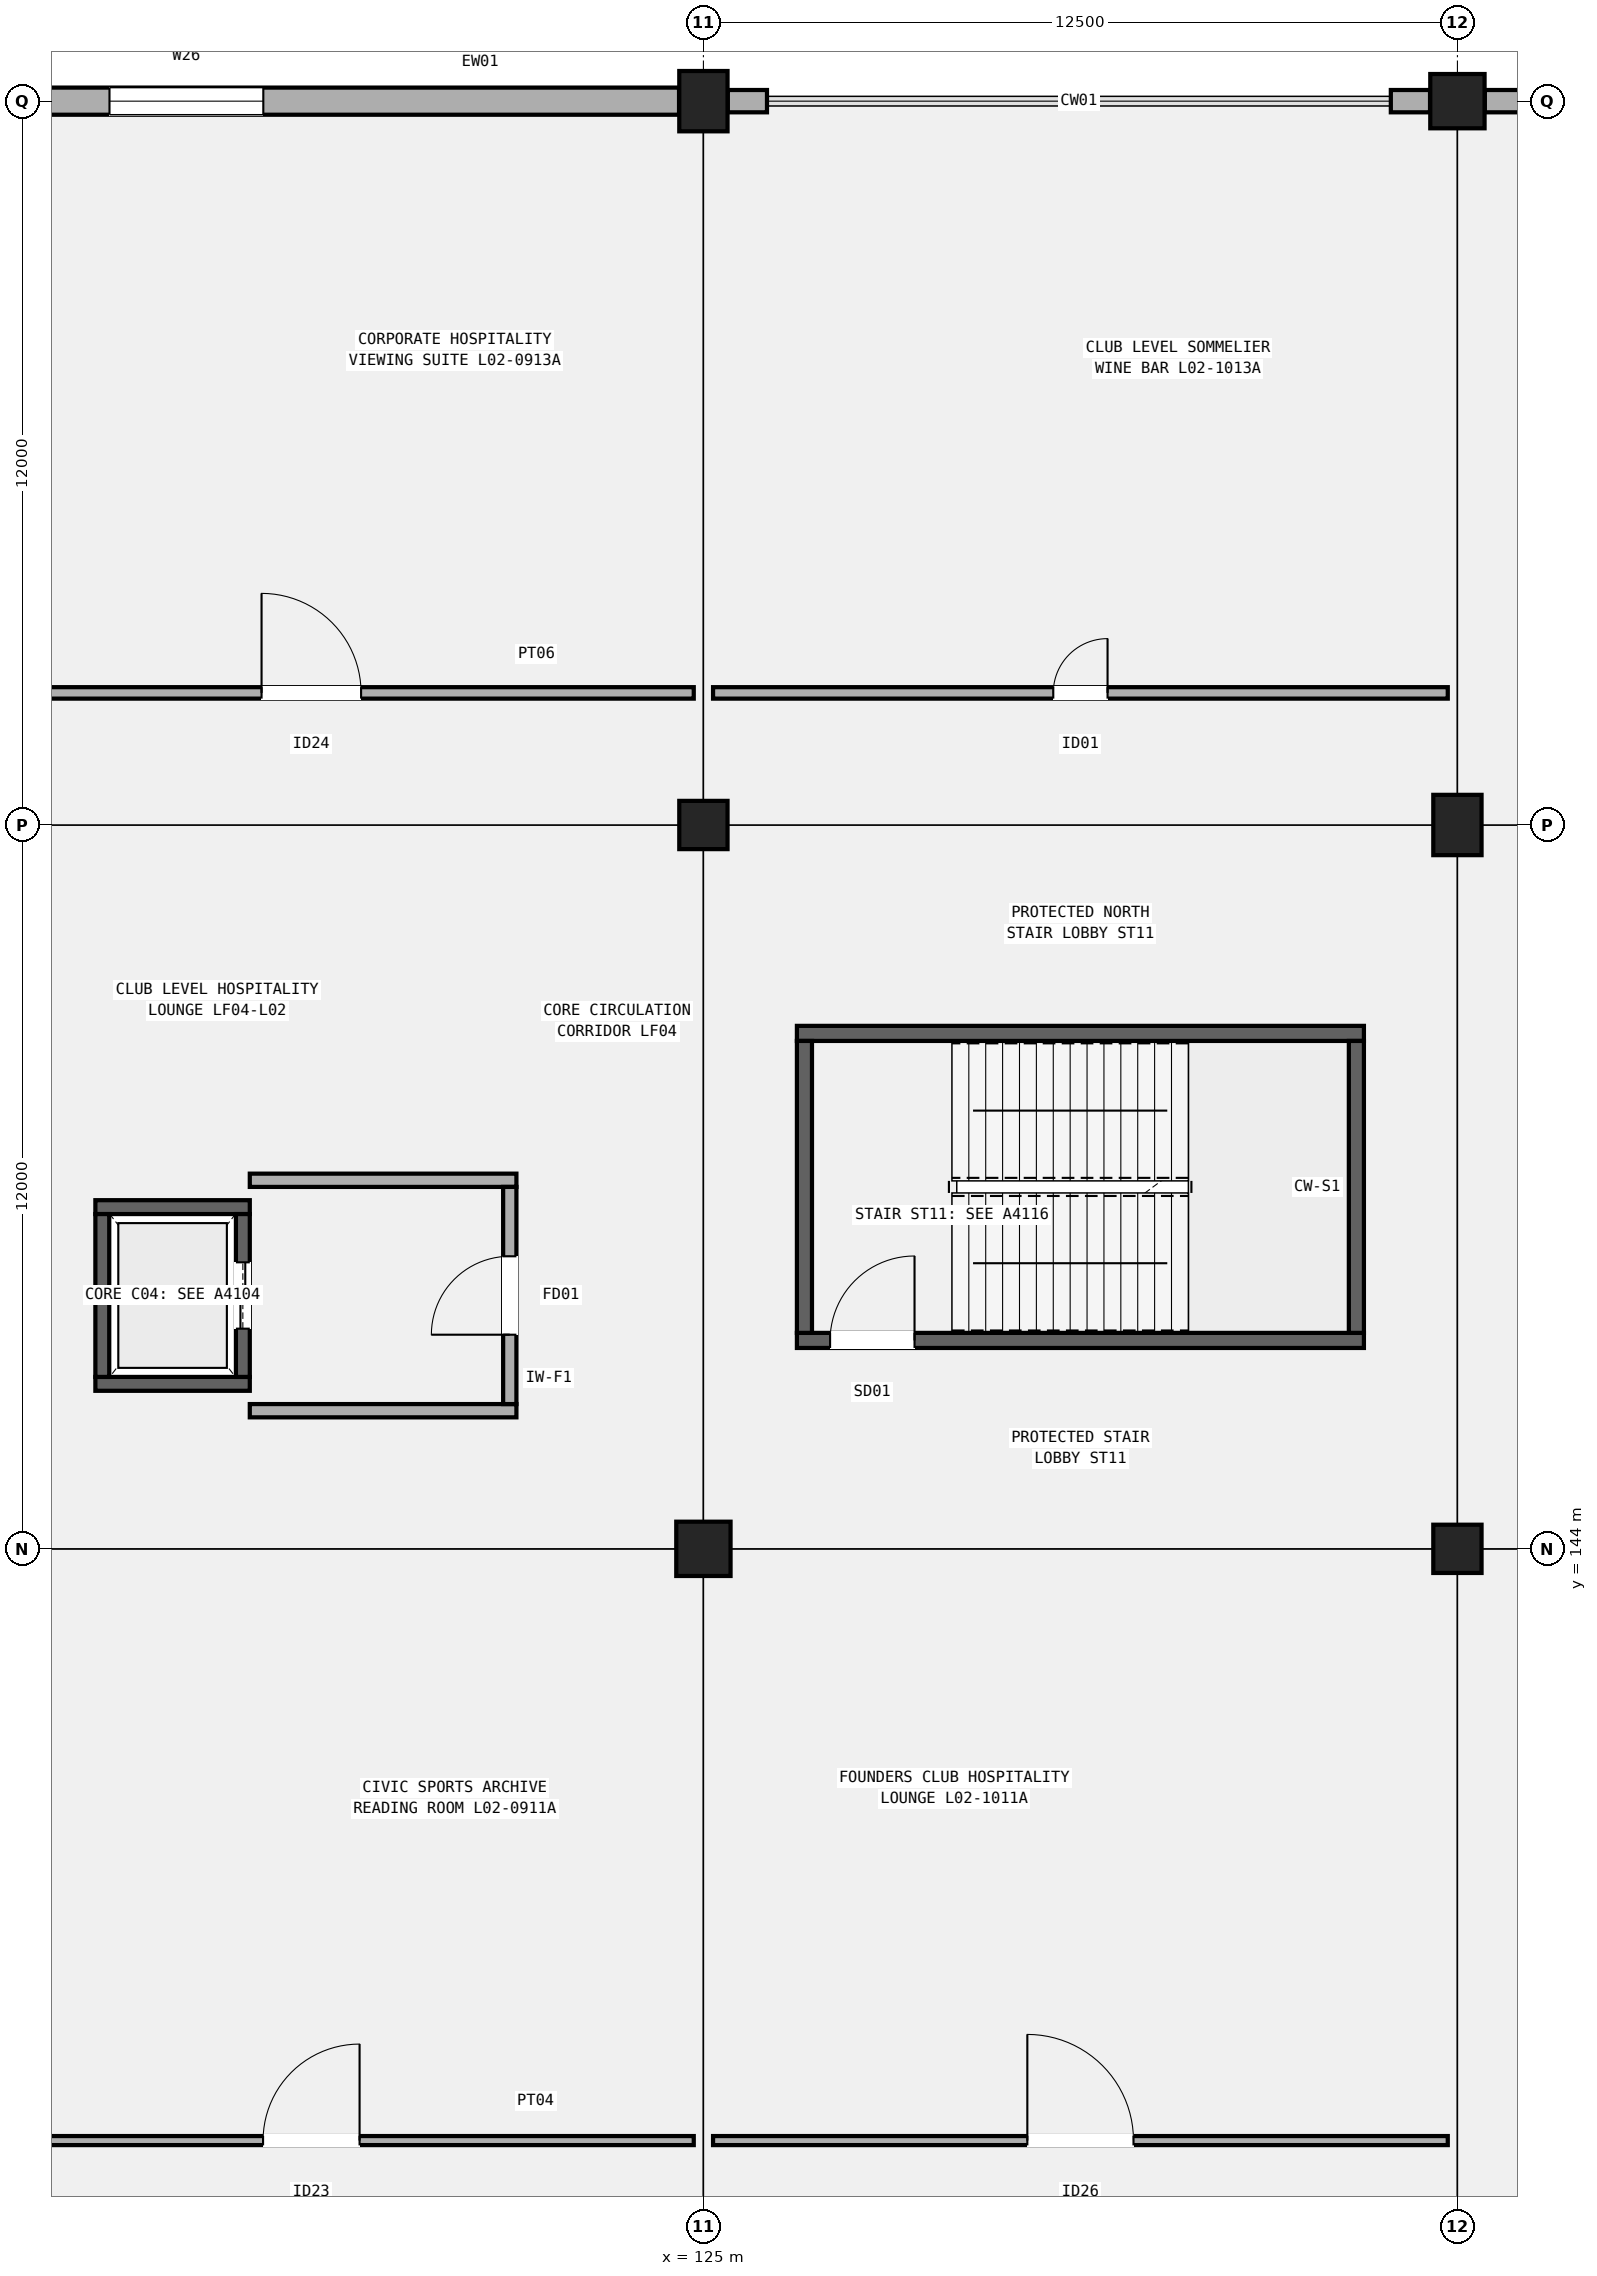
"""IFC4 building model, lengths in metres.
Left out: names, types, materials, properties, quantities, classifications, styles, units other than length and angle.
Written with IfcOpenShell. Run it as: python <this file> out.ifc"""

import sys

from ifc_helpers import new_model, si_unit, direction, frame, frame_2d, origin, origin_2d, place, context, subcontext, project, spatial, rectangle, extrude, element, fill, save


model = new_model("IFC4")
c1 = context("Model", 3, precision=1e-05, world=origin(), true_north=direction((0.0, 1.0)))
c2 = subcontext(c1, "Body", "Model", "MODEL_VIEW")
j1 = project(units=[si_unit("LENGTHUNIT", "METRE"), si_unit("PLANEANGLEUNIT", "RADIAN")], contexts=[c1])
p1 = place(None, origin())
s1 = spatial("IfcSite", under=j1, at=p1, CompositionType="ELEMENT")
p2 = place(p1, origin())
s2 = spatial("IfcBuilding", under=s1, at=p2, CompositionType="ELEMENT")
p3 = place(p2, frame((0.0, 0.0, 10.2)))
s3 = spatial("IfcBuildingStorey", under=s2, at=p3, CompositionType="ELEMENT", Elevation=10.2)
p4 = place(p3, frame((125.0, 144.0, 0.0), z_axis=(0.0, 0.0, 1.0), x_axis=(1.0, 0.0, 0.0)))
e1 = element("IfcColumn", 1, at=p4, inside=s3, PredefinedType="COLUMN", context=c2, shape_type="SweptSolid", body=[
    extrude(rectangle(XDim=0.9, YDim=0.9, at=origin_2d()), origin(), (0.0, 0.0, 1.0), 5.1),
])
p5 = place(p3, frame((125.0, 156.0, 0.0), z_axis=(0.0, 0.0, 1.0), x_axis=(1.0, 0.0, 0.0)))
e2 = element("IfcColumn", 2, at=p5, inside=s3, PredefinedType="COLUMN", context=c2, shape_type="SweptSolid", body=[
    extrude(rectangle(XDim=0.8, YDim=0.8, at=origin_2d()), origin(), (0.0, 0.0, 1.0), 5.1),
])
p6 = place(p3, frame((125.0, 168.0, 0.0), z_axis=(0.0, 0.0, 1.0), x_axis=(1.0, 0.0, 0.0)))
e3 = element("IfcColumn", 3, at=p6, inside=s3, PredefinedType="COLUMN", context=c2, shape_type="SweptSolid", body=[
    extrude(rectangle(XDim=0.8, YDim=1.0, at=origin_2d()), origin(), (0.0, 0.0, 1.0), 5.1),
])
p7 = place(p3, frame((137.5, 144.0, 0.0), z_axis=(0.0, 0.0, 1.0), x_axis=(1.0, 0.0, 0.0)))
e4 = element("IfcColumn", 4, at=p7, inside=s3, PredefinedType="COLUMN", context=c2, shape_type="SweptSolid", body=[
    extrude(rectangle(XDim=0.8, YDim=0.8, at=origin_2d()), origin(), (0.0, 0.0, 1.0), 5.1),
])
p8 = place(p3, frame((137.5, 156.0, 0.0), z_axis=(0.0, 0.0, 1.0), x_axis=(1.0, 0.0, 0.0)))
e5 = element("IfcColumn", 5, at=p8, inside=s3, PredefinedType="COLUMN", context=c2, shape_type="SweptSolid", body=[
    extrude(rectangle(XDim=0.8, YDim=1.0, at=origin_2d()), origin(), (0.0, 0.0, 1.0), 5.1),
])
p9 = place(p3, frame((137.5, 168.0, 0.0), z_axis=(0.0, 0.0, 1.0), x_axis=(1.0, 0.0, 0.0)))
e6 = element("IfcColumn", 6, at=p9, inside=s3, PredefinedType="COLUMN", context=c2, shape_type="SweptSolid", body=[
    extrude(rectangle(XDim=0.9, YDim=0.9, at=origin_2d()), origin(), (0.0, 0.0, 1.0), 5.1),
])
p10 = place(p3, frame((112.404, 168.0, 0.0), z_axis=(0.0, 0.0, 1.0), x_axis=(1.0, 0.0, 0.0)))
e7 = element("IfcWall", 7, at=p10, inside=s3, PredefinedType="SOLIDWALL", context=c2, shape_type="SweptSolid", body=[
    extrude(rectangle(XDim=12.192, YDim=0.45, at=frame_2d((6.096, 0.0))), origin(), (0.0, 0.0, 1.0), 4.22),
])
p11 = place(p10, frame((2.75, 0.0, 0.95)))
e8 = element("IfcOpeningElement", 8, at=p11, cuts=e7, PredefinedType="OPENING", context=c2, shape_type="SweptSolid", body=[
    extrude(rectangle(XDim=2.55, YDim=1.95, at=frame_2d((1.275, 0.975))), frame((0.0, 0.235, 0.0), z_axis=(0.0, -1.0, 0.0), x_axis=(1.0, 0.0, 0.0)), (0.0, 0.0, 1.0), 0.47),
])
for number, where, z_axis, x_axis in (
    (9, (125.404, 168.0, 0.0), (0.0, 0.0, 1.0), (1.0, 0.0, 0.0)),
    (10, (136.396, 168.0, 0.0), (0.0, 0.0, 1.0), (1.0, 0.0, 0.0)),
):
    element("IfcWall", number, at=place(p3, frame(where, z_axis=z_axis, x_axis=x_axis)), inside=s3, PredefinedType="SOLIDWALL", context=c2, shape_type="SweptSolid", body=[
        extrude(rectangle(XDim=0.65, YDim=0.37, at=frame_2d((0.325, 0.0))), origin(), (0.0, 0.0, 1.0), 4.02),
    ])
p12 = place(p3, frame((137.954, 168.0, 0.0), z_axis=(0.0, 0.0, 1.0), x_axis=(1.0, 0.0, 0.0)))
e11 = element("IfcWall", 11, at=p12, inside=s3, PredefinedType="SOLIDWALL", context=c2, shape_type="SweptSolid", body=[
    extrude(rectangle(XDim=0.65, YDim=0.37, at=frame_2d((0.325, 0.0))), origin(), (0.0, 0.0, 1.0), 4.12),
])
p13 = place(p3, frame((126.55, 147.455, 0.0), z_axis=(0.0, 0.0, 1.0), x_axis=(1.0, 0.0, 0.0)))
e12 = element("IfcWall", 12, at=p13, inside=s3, PredefinedType="SHEAR", context=c2, shape_type="SweptSolid", body=[
    extrude(rectangle(XDim=9.4, YDim=0.25, at=frame_2d((4.7, 0.0))), origin(), (0.0, 0.0, 1.0), 4.82),
])
p14 = place(p13, frame((0.55, 0.0, 0.0)))
e13 = element("IfcOpeningElement", 13, at=p14, cuts=e12, PredefinedType="OPENING", context=c2, shape_type="SweptSolid", body=[
    extrude(rectangle(XDim=1.4, YDim=2.15, at=frame_2d((0.7, 1.075))), frame((0.0, 0.135, 0.0), z_axis=(0.0, -1.0, 0.0), x_axis=(1.0, 0.0, 0.0)), (0.0, 0.0, 1.0), 0.27),
])
p15 = place(p3, frame((126.55, 152.545, 0.0), z_axis=(0.0, 0.0, 1.0), x_axis=(1.0, 0.0, 0.0)))
e14 = element("IfcWall", 14, at=p15, inside=s3, PredefinedType="SHEAR", context=c2, shape_type="SweptSolid", body=[
    extrude(rectangle(XDim=9.4, YDim=0.25, at=frame_2d((4.7, 0.0))), origin(), (0.0, 0.0, 1.0), 4.82),
])
for number, where, z_axis, x_axis in (
    (15, (126.675, 147.58, 0.0), (0.0, 0.0, 1.0), (0.0, 1.0, 0.0)),
    (16, (135.825, 147.58, 0.0), (0.0, 0.0, 1.0), (0.0, 1.0, 0.0)),
):
    element("IfcWall", number, at=place(p3, frame(where, z_axis=z_axis, x_axis=x_axis)), inside=s3, PredefinedType="SHEAR", context=c2, shape_type="SweptSolid", body=[
        extrude(rectangle(XDim=4.84, YDim=0.25, at=frame_2d((2.42, 0.0))), origin(), (0.0, 0.0, 1.0), 4.82),
    ])
for number, where, z_axis, x_axis in (
    (17, (114.92, 146.735, 0.0), (0.0, 0.0, 1.0), (1.0, 0.0, 0.0)),
    (18, (114.92, 149.665, 0.0), (0.0, 0.0, 1.0), (1.0, 0.0, 0.0)),
):
    element("IfcWall", number, at=place(p3, frame(where, z_axis=z_axis, x_axis=x_axis)), inside=s3, PredefinedType="SHEAR", context=c2, shape_type="SweptSolid", body=[
        extrude(rectangle(XDim=2.56, YDim=0.23, at=frame_2d((1.28, 0.0))), origin(), (0.0, 0.0, 1.0), 4.82),
    ])
p16 = place(p3, frame((115.035, 146.85, 0.0), z_axis=(0.0, 0.0, 1.0), x_axis=(0.0, 1.0, 0.0)))
e19 = element("IfcWall", 19, at=p16, inside=s3, PredefinedType="SHEAR", context=c2, shape_type="SweptSolid", body=[
    extrude(rectangle(XDim=2.7, YDim=0.23, at=frame_2d((1.35, 0.0))), origin(), (0.0, 0.0, 1.0), 4.82),
])
p17 = place(p3, frame((117.365, 146.85, 0.0), z_axis=(0.0, 0.0, 1.0), x_axis=(0.0, 1.0, 0.0)))
e20 = element("IfcWall", 20, at=p17, inside=s3, PredefinedType="SHEAR", context=c2, shape_type="SweptSolid", body=[
    extrude(rectangle(XDim=2.7, YDim=0.23, at=frame_2d((1.35, 0.0))), origin(), (0.0, 0.0, 1.0), 4.82),
])
p18 = place(p17, frame((0.8, 0.0, 0.0)))
e21 = element("IfcOpeningElement", 21, at=p18, cuts=e20, PredefinedType="OPENING", context=c2, shape_type="SweptSolid", body=[
    extrude(rectangle(XDim=1.1, YDim=2.15, at=frame_2d((0.55, 1.075))), frame((0.0, 0.125, 0.0), z_axis=(0.0, -1.0, 0.0), x_axis=(1.0, 0.0, 0.0)), (0.0, 0.0, 1.0), 0.25),
])
for number, where, z_axis, x_axis in (
    (22, (117.48, 146.29, 0.0), (0.0, 0.0, 1.0), (1.0, 0.0, 0.0)),
    (23, (117.48, 150.11, 0.0), (0.0, 0.0, 1.0), (1.0, 0.0, 0.0)),
):
    element("IfcWall", number, at=place(p3, frame(where, z_axis=z_axis, x_axis=x_axis)), inside=s3, PredefinedType="SOLIDWALL", context=c2, shape_type="SweptSolid", body=[
        extrude(rectangle(XDim=4.42, YDim=0.22, at=frame_2d((2.21, 0.0))), origin(), (0.0, 0.0, 1.0), 4.22),
    ])
p19 = place(p3, frame((121.79, 146.4, 0.0), z_axis=(0.0, 0.0, 1.0), x_axis=(0.0, 1.0, 0.0)))
e24 = element("IfcWall", 24, at=p19, inside=s3, PredefinedType="SOLIDWALL", context=c2, shape_type="SweptSolid", body=[
    extrude(rectangle(XDim=3.6, YDim=0.22, at=frame_2d((1.8, 0.0))), origin(), (0.0, 0.0, 1.0), 4.22),
])
p20 = place(p19, frame((1.15, 0.0, 0.0)))
e25 = element("IfcOpeningElement", 25, at=p20, cuts=e24, PredefinedType="OPENING", context=c2, shape_type="SweptSolid", body=[
    extrude(rectangle(XDim=1.3, YDim=2.15, at=frame_2d((0.65, 1.075))), frame((0.0, 0.12, 0.0), z_axis=(0.0, -1.0, 0.0), x_axis=(1.0, 0.0, 0.0)), (0.0, 0.0, 1.0), 0.24),
])
p21 = place(p3, frame((112.16, 134.19, 0.0), z_axis=(0.0, 0.0, 1.0), x_axis=(1.0, 0.0, 0.0)))
e26 = element("IfcWall", 26, at=p21, inside=s3, PredefinedType="PARTITIONING", context=c2, shape_type="SweptSolid", body=[
    extrude(rectangle(XDim=12.68, YDim=0.15, at=frame_2d((6.34, 0.0))), origin(), (0.0, 0.0, 1.0), 4.22),
])
p22 = place(p21, frame((5.54, 0.0, 0.0)))
e27 = element("IfcOpeningElement", 27, at=p22, cuts=e26, PredefinedType="OPENING", context=c2, shape_type="SweptSolid", body=[
    extrude(rectangle(XDim=1.6, YDim=2.3, at=frame_2d((0.8, 1.15))), frame((0.0, 0.085, 0.0), z_axis=(0.0, -1.0, 0.0), x_axis=(1.0, 0.0, 0.0)), (0.0, 0.0, 1.0), 0.17),
])
p23 = place(p3, frame((112.16, 158.19, 0.0), z_axis=(0.0, 0.0, 1.0), x_axis=(1.0, 0.0, 0.0)))
e28 = element("IfcWall", 28, at=p23, inside=s3, PredefinedType="PARTITIONING", context=c2, shape_type="SweptSolid", body=[
    extrude(rectangle(XDim=12.68, YDim=0.19, at=frame_2d((6.34, 0.0))), origin(), (0.0, 0.0, 1.0), 4.22),
])
p24 = place(p23, frame((5.515, 0.0, 0.0)))
e29 = element("IfcOpeningElement", 29, at=p24, cuts=e28, PredefinedType="OPENING", context=c2, shape_type="SweptSolid", body=[
    extrude(rectangle(XDim=1.65, YDim=2.28, at=frame_2d((0.825, 1.14))), frame((0.0, 0.105, 0.0), z_axis=(0.0, -1.0, 0.0), x_axis=(1.0, 0.0, 0.0)), (0.0, 0.0, 1.0), 0.21),
])
p25 = place(p3, frame((125.16, 134.19, 0.0), z_axis=(0.0, 0.0, 1.0), x_axis=(1.0, 0.0, 0.0)))
e30 = element("IfcWall", 30, at=p25, inside=s3, PredefinedType="PARTITIONING", context=c2, shape_type="SweptSolid", body=[
    extrude(rectangle(XDim=12.18, YDim=0.15, at=frame_2d((6.09, 0.0))), origin(), (0.0, 0.0, 1.0), 4.22),
])
p26 = place(p25, frame((5.21, 0.0, 0.0)))
e31 = element("IfcOpeningElement", 31, at=p26, cuts=e30, PredefinedType="OPENING", context=c2, shape_type="SweptSolid", body=[
    extrude(rectangle(XDim=1.76, YDim=2.3, at=frame_2d((0.88, 1.15))), frame((0.0, 0.085, 0.0), z_axis=(0.0, -1.0, 0.0), x_axis=(1.0, 0.0, 0.0)), (0.0, 0.0, 1.0), 0.17),
])
p27 = place(p3, frame((125.16, 158.19, 0.0), z_axis=(0.0, 0.0, 1.0), x_axis=(1.0, 0.0, 0.0)))
e32 = element("IfcWall", 32, at=p27, inside=s3, PredefinedType="PARTITIONING", context=c2, shape_type="SweptSolid", body=[
    extrude(rectangle(XDim=12.18, YDim=0.19, at=frame_2d((6.09, 0.0))), origin(), (0.0, 0.0, 1.0), 4.22),
])
p28 = place(p27, frame((5.64, 0.0, 0.0)))
e33 = element("IfcOpeningElement", 33, at=p28, cuts=e32, PredefinedType="OPENING", context=c2, shape_type="SweptSolid", body=[
    extrude(rectangle(XDim=0.9, YDim=2.06, at=frame_2d((0.45, 1.03))), frame((0.0, 0.105, 0.0), z_axis=(0.0, -1.0, 0.0), x_axis=(1.0, 0.0, 0.0)), (0.0, 0.0, 1.0), 0.21),
])
p29 = place(p11, origin())
e34 = element("IfcWindow", 34, at=p29, inside=s3, PartitioningType="SINGLE_PANEL", PredefinedType="WINDOW", context=c2, shape_type="SweptSolid", body=[
    extrude(rectangle(XDim=2.55, YDim=1.95, at=frame_2d((1.275, 0.975))), frame((0.0, 0.03, 0.0), z_axis=(0.0, -1.0, 0.0), x_axis=(1.0, 0.0, 0.0)), (0.0, 0.0, 1.0), 0.06),
])
fill(e8, e34)
p30 = place(p14, origin())
e35 = element("IfcDoor", 35, at=p30, inside=s3, OperationType="SINGLE_SWING_RIGHT", PredefinedType="DOOR", context=c2, shape_type="SweptSolid", body=[
    extrude(rectangle(XDim=1.4, YDim=2.15, at=frame_2d((0.7, 1.075))), frame((0.0, 0.025, 0.0), z_axis=(0.0, -1.0, 0.0), x_axis=(1.0, 0.0, 0.0)), (0.0, 0.0, 1.0), 0.05),
])
fill(e13, e35)
p31 = place(p18, origin())
e36 = element("IfcDoor", 36, at=p31, inside=s3, OperationType="DOUBLE_DOOR_SLIDING", PredefinedType="DOOR", context=c2, shape_type="SweptSolid", body=[
    extrude(rectangle(XDim=1.1, YDim=2.15, at=frame_2d((0.55, 1.075))), frame((0.0, 0.025, 0.0), z_axis=(0.0, -1.0, 0.0), x_axis=(1.0, 0.0, 0.0)), (0.0, 0.0, 1.0), 0.05),
])
fill(e21, e36)
p32 = place(p20, origin())
e37 = element("IfcDoor", 37, at=p32, inside=s3, OperationType="SINGLE_SWING_LEFT", PredefinedType="DOOR", context=c2, shape_type="SweptSolid", body=[
    extrude(rectangle(XDim=1.3, YDim=2.15, at=frame_2d((0.65, 1.075))), frame((0.0, 0.025, 0.0), z_axis=(0.0, -1.0, 0.0), x_axis=(1.0, 0.0, 0.0)), (0.0, 0.0, 1.0), 0.05),
])
fill(e25, e37)
p33 = place(p22, origin())
e38 = element("IfcDoor", 38, at=p33, inside=s3, OperationType="SINGLE_SWING_RIGHT", PredefinedType="DOOR", context=c2, shape_type="SweptSolid", body=[
    extrude(rectangle(XDim=1.6, YDim=2.3, at=frame_2d((0.8, 1.15))), frame((0.0, 0.025, 0.0), z_axis=(0.0, -1.0, 0.0), x_axis=(1.0, 0.0, 0.0)), (0.0, 0.0, 1.0), 0.05),
])
fill(e27, e38)
p34 = place(p24, origin())
e39 = element("IfcDoor", 39, at=p34, inside=s3, OperationType="SINGLE_SWING_LEFT", PredefinedType="DOOR", context=c2, shape_type="SweptSolid", body=[
    extrude(rectangle(XDim=1.65, YDim=2.28, at=frame_2d((0.825, 1.14))), frame((0.0, 0.025, 0.0), z_axis=(0.0, -1.0, 0.0), x_axis=(1.0, 0.0, 0.0)), (0.0, 0.0, 1.0), 0.05),
])
fill(e29, e39)
p35 = place(p26, origin())
e40 = element("IfcDoor", 40, at=p35, inside=s3, OperationType="SINGLE_SWING_LEFT", PredefinedType="DOOR", context=c2, shape_type="SweptSolid", body=[
    extrude(rectangle(XDim=1.76, YDim=2.3, at=frame_2d((0.88, 1.15))), frame((0.0, 0.025, 0.0), z_axis=(0.0, -1.0, 0.0), x_axis=(1.0, 0.0, 0.0)), (0.0, 0.0, 1.0), 0.05),
])
fill(e31, e40)
p36 = place(p28, origin())
e41 = element("IfcDoor", 41, at=p36, inside=s3, OperationType="SINGLE_SWING_RIGHT", PredefinedType="DOOR", context=c2, shape_type="SweptSolid", body=[
    extrude(rectangle(XDim=0.9, YDim=2.06, at=frame_2d((0.45, 1.03))), frame((0.0, 0.025, 0.0), z_axis=(0.0, -1.0, 0.0), x_axis=(1.0, 0.0, 0.0)), (0.0, 0.0, 1.0), 0.05),
])
fill(e33, e41)
save(model, sys.argv[1])
